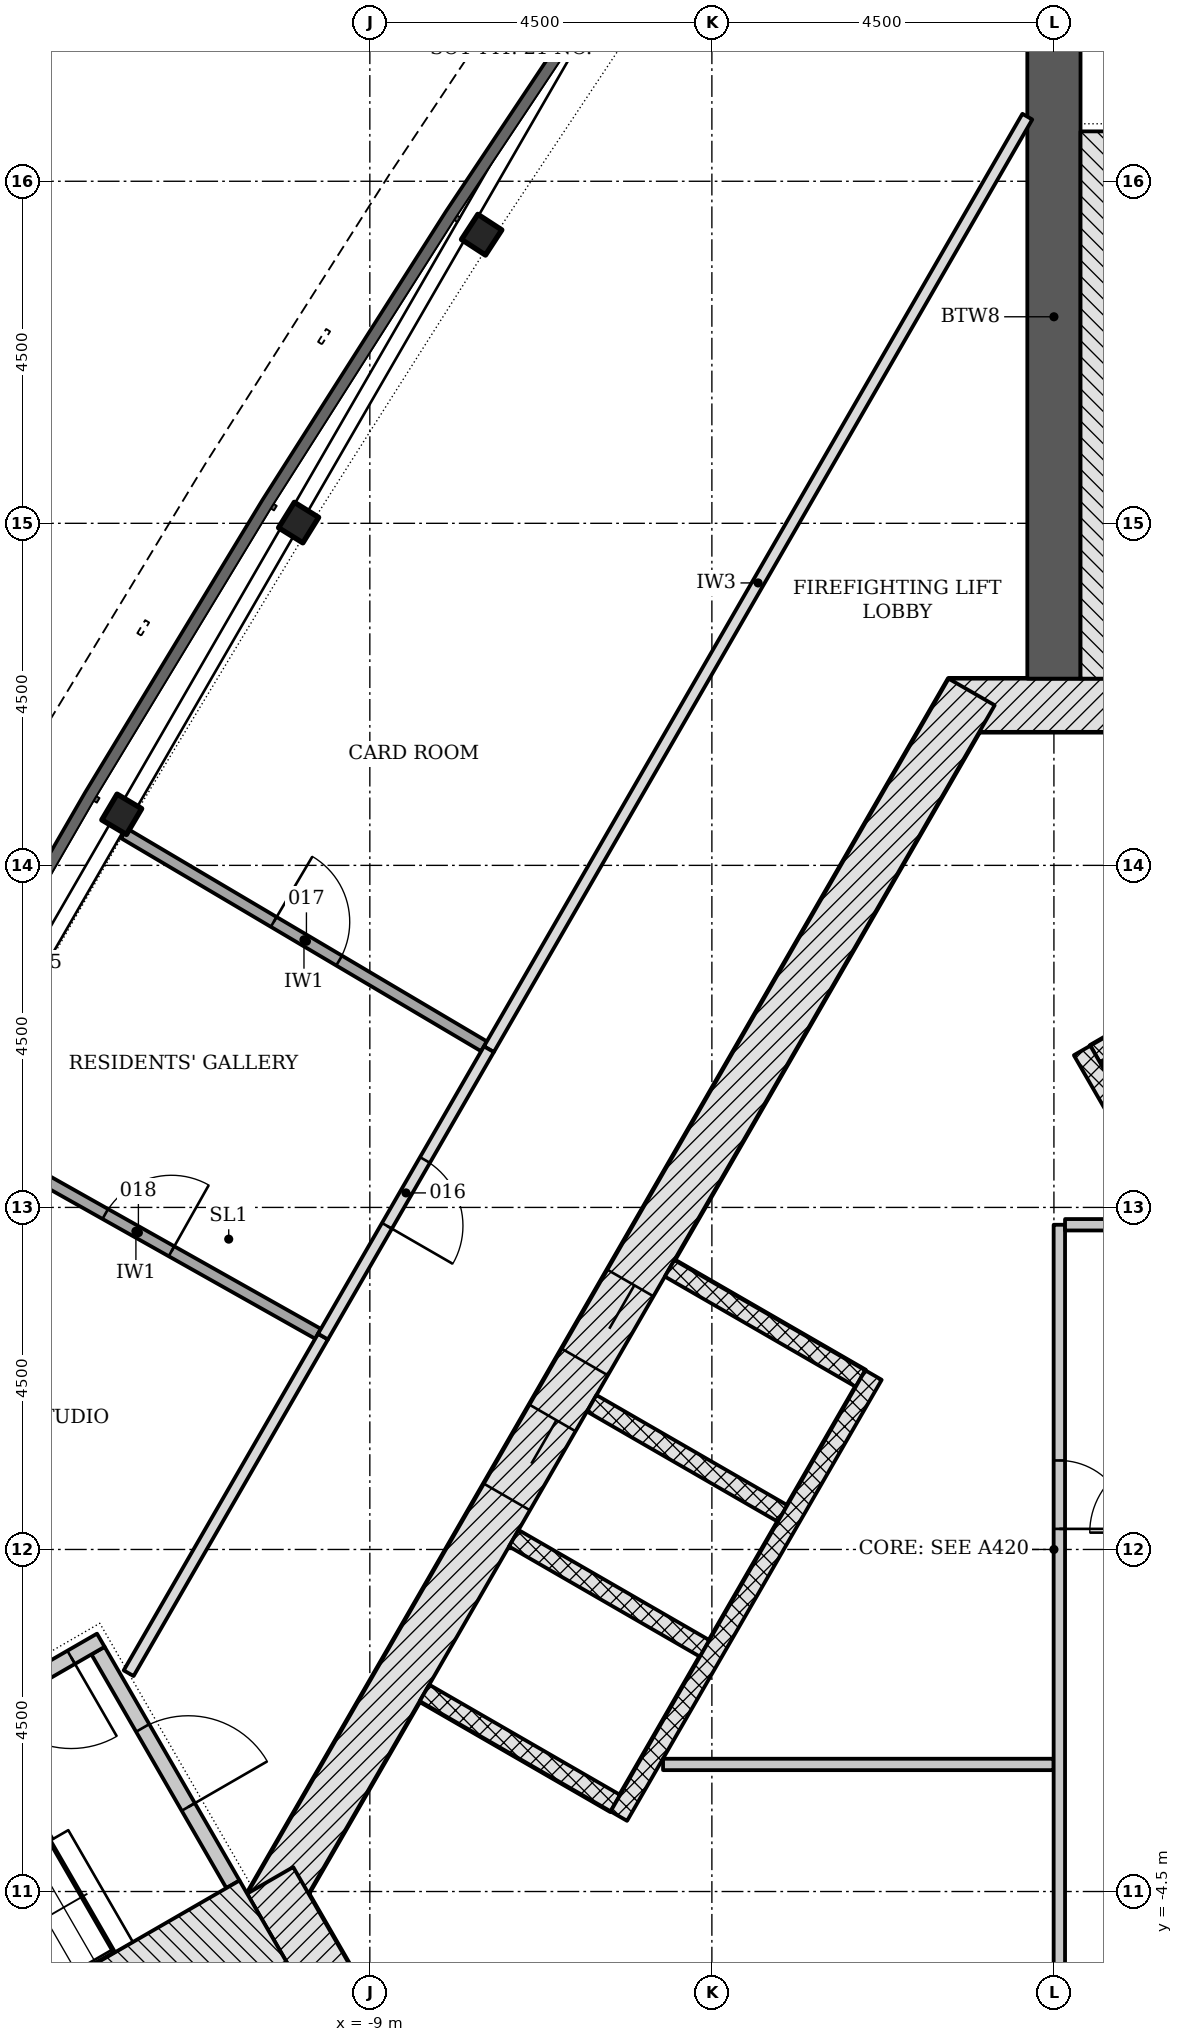
"""IFC4 building model, lengths in metres.
Left out: names, types, materials, properties, quantities, classifications, styles, units other than length and angle.
Written with IfcOpenShell. Run it as: python <this file> out.ifc"""

import sys

from ifc_helpers import new_model, si_unit, direction, frame, frame_2d, origin, origin_2d, place, context, subcontext, project, spatial, rectangle, i_section, extrude, element, fill, save


model = new_model("IFC4")
c1 = context("Model", 3, precision=1e-05, world=origin(), true_north=direction((0.0, 1.0)))
c2 = subcontext(c1, "Body", "Model", "MODEL_VIEW")
j1 = project(units=[si_unit("LENGTHUNIT", "METRE"), si_unit("PLANEANGLEUNIT", "RADIAN")], contexts=[c1])
p1 = place(None, origin())
s1 = spatial("IfcSite", under=j1, at=p1, CompositionType="ELEMENT")
p2 = place(p1, origin())
s2 = spatial("IfcBuilding", under=s1, at=p2, CompositionType="ELEMENT")
p3 = place(p2, frame((0.0, 0.0, 188.7)))
s3 = spatial("IfcBuildingStorey", under=s2, at=p3, CompositionType="ELEMENT", Elevation=188.7)
p4 = place(p3, frame((1.386, 11.106, -0.2), z_axis=(0.0, 0.0, 1.0), x_axis=(-1.0, 0.0, 0.0)))
e1 = element("IfcWall", 1, at=p4, inside=s3, PredefinedType="SHEAR", context=c2, shape_type="SweptSolid", body=[
    extrude(rectangle(XDim=2.771, YDim=0.7, at=frame_2d((1.386, 0.0))), origin(), (0.0, 0.0, 1.0), 3.6),
])
p5 = place(p3, frame((-1.083, 11.281, -0.2), z_axis=(0.0, 0.0, 1.0), x_axis=(-0.500001446645, -0.866024568562, 0.0)))
e2 = element("IfcWall", 2, at=p5, inside=s3, PredefinedType="SHEAR", context=c2, shape_type="SweptSolid", body=[
    extrude(rectangle(XDim=18.458, YDim=0.7, at=frame_2d((9.229, 0.0))), origin(), (0.0, 0.0, 1.0), 3.6),
])
p6 = place(p5, frame((8.979, 0.0, 0.2)))
e3 = element("IfcOpeningElement", 3, at=p6, cuts=e2, PredefinedType="OPENING", context=c2, shape_type="SweptSolid", body=[
    extrude(rectangle(XDim=1.2, YDim=2.1, at=frame_2d((0.6, 1.05))), frame((0.0, 0.36, 0.0), z_axis=(0.0, -1.0, 0.0), x_axis=(1.0, 0.0, 0.0)), (0.0, 0.0, 1.0), 0.72),
])
p7 = place(p5, frame((11.029, 0.0, 0.2)))
e4 = element("IfcOpeningElement", 4, at=p7, cuts=e2, PredefinedType="OPENING", context=c2, shape_type="SweptSolid", body=[
    extrude(rectangle(XDim=1.2, YDim=2.1, at=frame_2d((0.6, 1.05))), frame((0.0, 0.36, 0.0), z_axis=(0.0, -1.0, 0.0), x_axis=(1.0, 0.0, 0.0)), (0.0, 0.0, 1.0), 0.72),
])
p8 = place(p3, frame((-10.311, -4.353, -0.2), z_axis=(0.0, 0.0, 1.0), x_axis=(0.500042739161, -0.866000726912, 0.0)))
e5 = element("IfcWall", 5, at=p8, inside=s3, PredefinedType="SHEAR", context=c2, shape_type="SweptSolid", body=[
    extrude(rectangle(XDim=2.771, YDim=0.7, at=frame_2d((1.386, 0.0))), origin(), (0.0, 0.0, 1.0), 3.6),
])
p9 = place(p3, frame((0.0, 11.456, -0.2), z_axis=(0.0, 0.0, 1.0), x_axis=(0.0, 1.0, 0.0)))
e6 = element("IfcWall", 6, at=p9, inside=s3, PredefinedType="SHEAR", context=c2, shape_type="SweptSolid", body=[
    extrude(rectangle(XDim=9.522, YDim=0.7, at=frame_2d((4.761, 0.0))), origin(), (0.0, 0.0, 1.0), 3.6),
])
p10 = place(p3, frame((-9.922, -5.728, -0.2), z_axis=(0.0, 0.0, 1.0), x_axis=(-0.866025463095, -0.499999897272, 0.0)))
e7 = element("IfcWall", 7, at=p10, inside=s3, PredefinedType="SHEAR", context=c2, shape_type="SweptSolid", body=[
    extrude(rectangle(XDim=9.521, YDim=0.7, at=frame_2d((4.761, 0.0))), origin(), (0.0, 0.0, 1.0), 3.6),
])
for number, where, z_axis, x_axis in (
    (8, (-7.529, 17.297, -0.2), (0.0, 0.0, 1.0), (-0.546, -0.838, 0.0)),
    (9, (-9.937, 13.51, -0.2), (0.0, 0.0, 1.0), (-0.528, -0.85, 0.0)),
    (10, (-12.264, 9.672, -0.2), (0.0, 0.0, 1.0), (-0.509, -0.861, 0.0)),
):
    element("IfcColumn", number, at=place(p3, frame(where, z_axis=z_axis, x_axis=x_axis)), inside=s3, PredefinedType="COLUMN", context=c2, shape_type="SweptSolid", body=[
        extrude(i_section(OverallWidth=0.394, OverallDepth=0.376, WebThickness=0.017, FlangeThickness=0.028, FilletRadius=0.015, at=origin_2d()), origin(), (0.0, 0.0, 1.0), 3.6),
    ])
p11 = place(p3, frame((2.706, 7.769, -0.2), z_axis=(0.0, 0.0, 1.0), x_axis=(-0.866022959057, -0.500004234368, 0.0)))
e11 = element("IfcWall", 11, at=p11, inside=s3, PredefinedType="PARTITIONING", context=c2, shape_type="SweptSolid", body=[
    extrude(rectangle(XDim=2.5, YDim=0.25, at=frame_2d((1.25, 0.0))), origin(), (0.0, 0.0, 1.0), 3.6),
])
p12 = place(p3, frame((5.87, -2.961, 0.0), z_axis=(0.0, 0.0, 1.0), x_axis=(-0.50000615651, 0.866021849293, 0.0)))
e12 = element("IfcWall", 12, at=p12, inside=s3, PredefinedType="PARTITIONING", context=c2, shape_type="SweptSolid", body=[
    extrude(rectangle(XDim=11.0, YDim=0.25, at=frame_2d((5.5, 0.0))), origin(), (0.0, 0.0, 1.0), 3.4),
])
for number, where, z_axis, x_axis in (
    (13, (-5.056, 3.699, -0.2), (0.0, 0.0, 1.0), (0.866, -0.5, 0.0)),
    (14, (-6.081, 1.923, -0.2), (0.0, 0.0, 1.0), (0.866, -0.5, 0.0)),
    (15, (-7.106, 0.148, -0.2), (0.0, 0.0, 1.0), (0.866, -0.5, 0.0)),
    (16, (-8.281, -1.887, -0.2), (0.0, 0.0, 1.0), (0.866, -0.5, 0.0)),
):
    element("IfcWall", number, at=place(p3, frame(where, z_axis=z_axis, x_axis=x_axis)), inside=s3, PredefinedType="PARTITIONING", context=c2, shape_type="SweptSolid", body=[
        extrude(rectangle(XDim=2.9, YDim=0.25, at=frame_2d((1.45, 0.0))), origin(), (0.0, 0.0, 1.0), 3.6),
    ])
p13 = place(p3, frame((-2.374, 2.294, 0.0), z_axis=(0.0, 0.0, 1.0), x_axis=(-0.500003174267, -0.866023571113, 0.0)))
e17 = element("IfcWall", 17, at=p13, inside=s3, PredefinedType="PARTITIONING", context=c2, shape_type="SweptSolid", body=[
    extrude(rectangle(XDim=6.7, YDim=0.25, at=frame_2d((3.35, 0.0))), origin(), (0.0, 0.0, 1.0), 3.4),
])
p14 = place(p3, frame((-5.142, -2.828, 0.0), z_axis=(0.0, 0.0, 1.0), x_axis=(1.0, 0.0, 0.0)))
e18 = element("IfcWall", 18, at=p14, inside=s3, PredefinedType="PARTITIONING", context=c2, shape_type="SweptSolid", body=[
    extrude(rectangle(XDim=5.139, YDim=0.15, at=frame_2d((2.569, 0.0))), origin(), (0.0, 0.0, 1.0), 3.4),
])
p15 = place(p3, frame((0.071, 4.272, 0.0), z_axis=(0.0, 0.0, 1.0), x_axis=(0.0, -1.0, 0.0)))
e19 = element("IfcWall", 19, at=p15, inside=s3, PredefinedType="PARTITIONING", context=c2, shape_type="SweptSolid", body=[
    extrude(rectangle(XDim=10.5, YDim=0.15, at=frame_2d((5.25, 0.0))), origin(), (0.0, 0.0, 1.0), 3.4),
])
p16 = place(p15, frame((3.101, 0.0, 0.0)))
e20 = element("IfcOpeningElement", 20, at=p16, cuts=e19, PredefinedType="OPENING", context=c2, shape_type="SweptSolid", body=[
    extrude(rectangle(XDim=0.9, YDim=2.1, at=frame_2d((0.45, 1.05))), frame((0.0, 0.085, 0.0), z_axis=(0.0, -1.0, 0.0), x_axis=(1.0, 0.0, 0.0)), (0.0, 0.0, 1.0), 0.17),
])
p17 = place(p3, frame((0.146, 4.272, 0.0), z_axis=(0.0, 0.0, 1.0), x_axis=(1.0, 0.0, 0.0)))
e21 = element("IfcWall", 21, at=p17, inside=s3, PredefinedType="PARTITIONING", context=c2, shape_type="SweptSolid", body=[
    extrude(rectangle(XDim=1.25, YDim=0.15, at=frame_2d((0.625, 0.0))), origin(), (0.0, 0.0, 1.0), 3.4),
])
p18 = place(p3, frame((0.968, 11.456, -0.2), z_axis=(0.0, 0.0, 1.0), x_axis=(0.0, 1.0, 0.0)))
e22 = element("IfcWall", 22, at=p18, inside=s3, PredefinedType="SHEAR", context=c2, shape_type="SweptSolid", body=[
    extrude(rectangle(XDim=7.2, YDim=1.236, at=frame_2d((3.6, 0.0))), origin(), (0.0, 0.0, 1.0), 3.6),
])
p19 = place(p3, frame((-12.576, -1.331, -0.2), z_axis=(0.0, 0.0, 1.0), x_axis=(0.499970499736, -0.8660424351, 0.0)))
e23 = element("IfcWall", 23, at=p19, inside=s3, PredefinedType="SHEAR", context=c2, shape_type="SweptSolid", body=[
    extrude(rectangle(XDim=3.55, YDim=0.2, at=frame_2d((1.775, 0.0))), origin(), (0.0, 0.0, 1.0), 3.6),
])
p20 = place(p19, frame((1.175, 0.0, 0.2)))
e24 = element("IfcOpeningElement", 24, at=p20, cuts=e23, PredefinedType="OPENING", context=c2, shape_type="SweptSolid", body=[
    extrude(rectangle(XDim=1.2, YDim=2.1, at=frame_2d((0.6, 1.05))), frame((0.0, 0.11, 0.0), z_axis=(0.0, -1.0, 0.0), x_axis=(1.0, 0.0, 0.0)), (0.0, 0.0, 1.0), 0.22),
])
p21 = place(p3, frame((-12.539, -1.194, -0.2), z_axis=(0.0, 0.0, 1.0), x_axis=(-0.866045472092, -0.499965239061, 0.0)))
e25 = element("IfcWall", 25, at=p21, inside=s3, PredefinedType="SHEAR", context=c2, shape_type="SweptSolid", body=[
    extrude(rectangle(XDim=5.6, YDim=0.2, at=frame_2d((2.8, 0.0))), origin(), (0.0, 0.0, 1.0), 3.6),
])
p22 = place(p21, frame((0.45, 0.0, 0.2)))
e26 = element("IfcOpeningElement", 26, at=p22, cuts=e25, PredefinedType="OPENING", context=c2, shape_type="SweptSolid", body=[
    extrude(rectangle(XDim=1.2, YDim=2.1, at=frame_2d((0.6, 1.05))), frame((0.0, 0.11, 0.0), z_axis=(0.0, -1.0, 0.0), x_axis=(1.0, 0.0, 0.0)), (0.0, 0.0, 1.0), 0.22),
])
p23 = place(p3, frame((-10.406, -4.89, -0.2), z_axis=(0.0, 0.0, 1.0), x_axis=(-0.866018442252, -0.500012057535, 0.0)))
e27 = element("IfcWall", 27, at=p23, inside=s3, PredefinedType="SHEAR", context=c2, shape_type="SweptSolid", body=[
    extrude(rectangle(XDim=7.2, YDim=1.236, at=frame_2d((3.6, 0.0))), origin(), (0.0, 0.0, 1.0), 3.6),
])
p24 = place(p3, frame((-0.35, 18.85, 0.0), z_axis=(0.0, 0.0, 1.0), x_axis=(-0.500005388685, -0.866022292603, 0.0)))
e28 = element("IfcWall", 28, at=p24, inside=s3, PredefinedType="PARTITIONING", context=c2, shape_type="SweptSolid", body=[
    extrude(rectangle(XDim=14.167, YDim=0.15, at=frame_2d((7.083, 0.0))), origin(), (0.0, 0.0, 1.0), 2.852),
])
p25 = place(p3, frame((-9.616, 2.801, 0.0), z_axis=(0.0, 0.0, 1.0), x_axis=(-0.499995206172, -0.866028171485, 0.0)))
e29 = element("IfcWall", 29, at=p25, inside=s3, PredefinedType="PARTITIONING", context=c2, shape_type="SweptSolid", body=[
    extrude(rectangle(XDim=5.114, YDim=0.15, at=frame_2d((2.557, 0.0))), origin(), (0.0, 0.0, 1.0), 2.852),
])
p26 = place(p3, frame((-12.235, 9.422, 0.0), z_axis=(0.0, 0.0, 1.0), x_axis=(0.860631434237, -0.509228371562, 0.0)))
e30 = element("IfcWall", 30, at=p26, inside=s3, PredefinedType="PARTITIONING", context=c2, shape_type="SweptSolid", body=[
    extrude(rectangle(XDim=5.504, YDim=0.15, at=frame_2d((2.752, 0.0))), origin(), (0.0, 0.0, 1.0), 2.461),
])
p27 = place(p26, frame((2.29, 0.0, 0.0)))
e31 = element("IfcOpeningElement", 31, at=p27, cuts=e30, PredefinedType="OPENING", context=c2, shape_type="SweptSolid", body=[
    extrude(rectangle(XDim=1.0, YDim=2.1, at=frame_2d((0.5, 1.05))), frame((0.0, 0.085, 0.0), z_axis=(0.0, -1.0, 0.0), x_axis=(1.0, 0.0, 0.0)), (0.0, 0.0, 1.0), 0.17),
])
p28 = place(p3, frame((-14.474, 5.536, 0.0), z_axis=(0.0, 0.0, 1.0), x_axis=(0.871324088074, -0.490707992132, 0.0)))
e32 = element("IfcWall", 32, at=p28, inside=s3, PredefinedType="PARTITIONING", context=c2, shape_type="SweptSolid", body=[
    extrude(rectangle(XDim=5.5, YDim=0.15, at=frame_2d((2.75, 0.0))), origin(), (0.0, 0.0, 1.0), 2.461),
])
p29 = place(p28, frame((2.287, 0.0, 0.0)))
e33 = element("IfcOpeningElement", 33, at=p29, cuts=e32, PredefinedType="OPENING", context=c2, shape_type="SweptSolid", body=[
    extrude(rectangle(XDim=1.0, YDim=2.1, at=frame_2d((0.5, 1.05))), frame((0.0, 0.085, 0.0), z_axis=(0.0, -1.0, 0.0), x_axis=(1.0, 0.0, 0.0)), (0.0, 0.0, 1.0), 0.17),
])
p30 = place(p3, frame((-7.434, 6.581, 0.0), z_axis=(0.0, 0.0, 1.0), x_axis=(-0.499964504253, -0.866045896294, 0.0)))
e34 = element("IfcWall", 34, at=p30, inside=s3, PredefinedType="PARTITIONING", context=c2, shape_type="SweptSolid", body=[
    extrude(rectangle(XDim=4.365, YDim=0.15, at=frame_2d((2.183, 0.0))), origin(), (0.0, 0.0, 1.0), 2.852),
])
p31 = place(p30, frame((1.683, 0.0, 0.0)))
e35 = element("IfcOpeningElement", 35, at=p31, cuts=e34, PredefinedType="OPENING", context=c2, shape_type="SweptSolid", body=[
    extrude(rectangle(XDim=1.0, YDim=2.1, at=frame_2d((0.5, 1.05))), frame((0.0, 0.085, 0.0), z_axis=(0.0, -1.0, 0.0), x_axis=(1.0, 0.0, 0.0)), (0.0, 0.0, 1.0), 0.17),
])
p32 = place(p6, origin())
e36 = element("IfcDoor", 36, at=p32, inside=s3, OperationType="DOUBLE_DOOR_SLIDING", PredefinedType="DOOR", context=c2, shape_type="SweptSolid", body=[
    extrude(rectangle(XDim=1.2, YDim=2.1, at=frame_2d((0.6, 1.05))), frame((0.0, 0.025, 0.0), z_axis=(0.0, -1.0, 0.0), x_axis=(1.0, 0.0, 0.0)), (0.0, 0.0, 1.0), 0.05),
])
fill(e3, e36)
p33 = place(p7, origin())
e37 = element("IfcDoor", 37, at=p33, inside=s3, OperationType="DOUBLE_DOOR_SLIDING", PredefinedType="DOOR", context=c2, shape_type="SweptSolid", body=[
    extrude(rectangle(XDim=1.2, YDim=2.1, at=frame_2d((0.6, 1.05))), frame((0.0, 0.025, 0.0), z_axis=(0.0, -1.0, 0.0), x_axis=(1.0, 0.0, 0.0)), (0.0, 0.0, 1.0), 0.05),
])
fill(e4, e37)
p34 = place(p16, origin())
e38 = element("IfcDoor", 38, at=p34, inside=s3, OperationType="SINGLE_SWING_RIGHT", PredefinedType="DOOR", context=c2, shape_type="SweptSolid", body=[
    extrude(rectangle(XDim=0.9, YDim=2.1, at=frame_2d((0.45, 1.05))), frame((0.0, 0.025, 0.0), z_axis=(0.0, -1.0, 0.0), x_axis=(1.0, 0.0, 0.0)), (0.0, 0.0, 1.0), 0.05),
])
fill(e20, e38)
p35 = place(p20, origin())
e39 = element("IfcDoor", 39, at=p35, inside=s3, OperationType="SINGLE_SWING_RIGHT", PredefinedType="DOOR", context=c2, shape_type="SweptSolid", body=[
    extrude(rectangle(XDim=1.2, YDim=2.1, at=frame_2d((0.6, 1.05))), frame((0.0, 0.025, 0.0), z_axis=(0.0, -1.0, 0.0), x_axis=(1.0, 0.0, 0.0)), (0.0, 0.0, 1.0), 0.05),
])
fill(e24, e39)
p36 = place(p22, origin())
e40 = element("IfcDoor", 40, at=p36, inside=s3, OperationType="SINGLE_SWING_LEFT", PredefinedType="DOOR", context=c2, shape_type="SweptSolid", body=[
    extrude(rectangle(XDim=1.2, YDim=2.1, at=frame_2d((0.6, 1.05))), frame((0.0, 0.025, 0.0), z_axis=(0.0, -1.0, 0.0), x_axis=(1.0, 0.0, 0.0)), (0.0, 0.0, 1.0), 0.05),
])
fill(e26, e40)
p37 = place(p31, origin())
e41 = element("IfcDoor", 41, at=p37, inside=s3, OperationType="SINGLE_SWING_RIGHT", PredefinedType="DOOR", context=c2, shape_type="SweptSolid", body=[
    extrude(rectangle(XDim=1.0, YDim=2.1, at=frame_2d((0.5, 1.05))), frame((0.0, 0.025, 0.0), z_axis=(0.0, -1.0, 0.0), x_axis=(1.0, 0.0, 0.0)), (0.0, 0.0, 1.0), 0.05),
])
fill(e35, e41)
p38 = place(p27, origin())
e42 = element("IfcDoor", 42, at=p38, inside=s3, OperationType="SINGLE_SWING_LEFT", PredefinedType="DOOR", context=c2, shape_type="SweptSolid", body=[
    extrude(rectangle(XDim=1.0, YDim=2.1, at=frame_2d((0.5, 1.05))), frame((0.0, 0.025, 0.0), z_axis=(0.0, -1.0, 0.0), x_axis=(1.0, 0.0, 0.0)), (0.0, 0.0, 1.0), 0.05),
])
fill(e31, e42)
p39 = place(p29, origin())
e43 = element("IfcDoor", 43, at=p39, inside=s3, OperationType="SINGLE_SWING_RIGHT", PredefinedType="DOOR", context=c2, shape_type="SweptSolid", body=[
    extrude(rectangle(XDim=1.0, YDim=2.1, at=frame_2d((0.5, 1.05))), frame((0.0, 0.025, 0.0), z_axis=(0.0, -1.0, 0.0), x_axis=(1.0, 0.0, 0.0)), (0.0, 0.0, 1.0), 0.05),
])
fill(e33, e43)
save(model, sys.argv[1])
